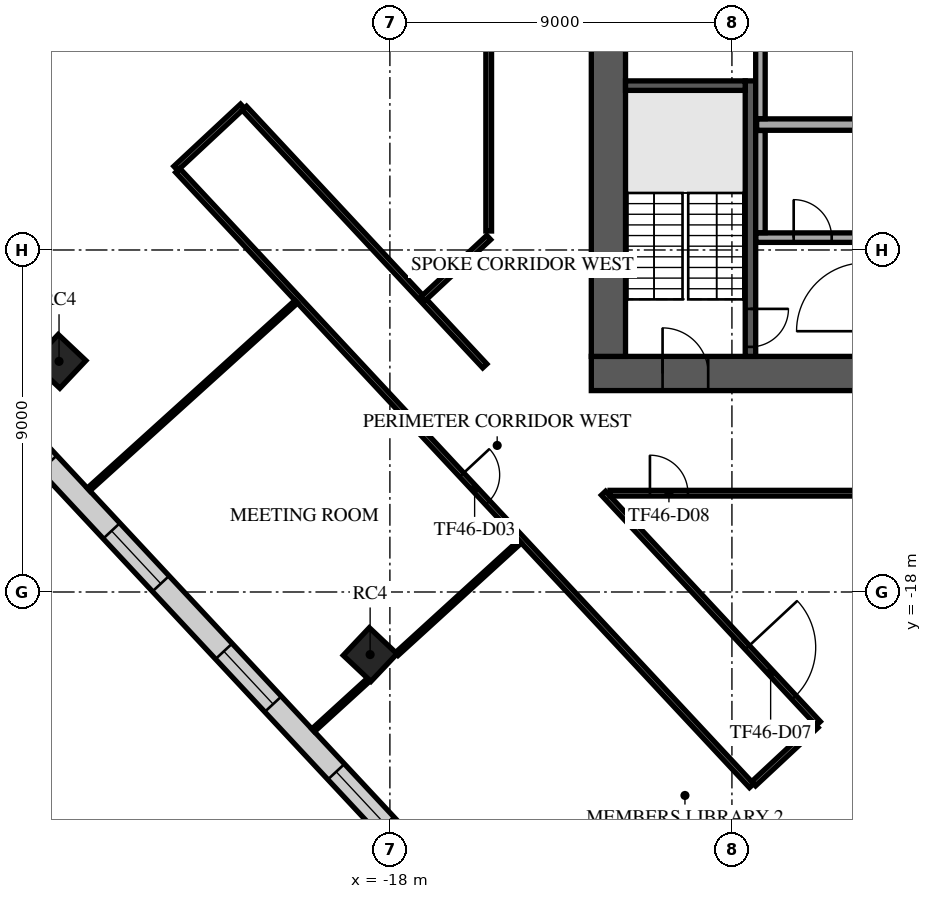
"""IFC4 building model, lengths in metres.
Left out: names, types, materials, properties, quantities, classifications, styles, units other than length and angle.
Written with IfcOpenShell. Run it as: python <this file> out.ifc"""

import sys

from ifc_helpers import new_model, si_unit, direction, frame, frame_2d, origin, origin_2d, place, context, subcontext, project, spatial, rectangle, extrude, element, fill, save


model = new_model("IFC4")
c1 = context("Model", 3, precision=1e-05, world=origin(), true_north=direction((0.0, 1.0)))
c2 = subcontext(c1, "Body", "Model", "MODEL_VIEW")
j1 = project(units=[si_unit("LENGTHUNIT", "METRE"), si_unit("PLANEANGLEUNIT", "RADIAN")], contexts=[c1])
p1 = place(None, origin())
s1 = spatial("IfcSite", under=j1, at=p1, CompositionType="ELEMENT")
p2 = place(p1, origin())
s2 = spatial("IfcBuilding", under=s1, at=p2, CompositionType="ELEMENT")
p3 = place(p2, frame((0.0, 0.0, 197.3)))
s3 = spatial("IfcBuildingStorey", under=s2, at=p3, CompositionType="ELEMENT", Elevation=197.3)
for number, where, z_axis, x_axis in (
    (1, (-26.706, -11.931, 0.0), (0.0, 0.0, 1.0), (0.686, 0.728, 0.0)),
    (2, (-18.52, -19.647, 0.0), (0.0, 0.0, 1.0), (0.686, 0.728, 0.0)),
):
    element("IfcColumn", number, at=place(p3, frame(where, z_axis=z_axis, x_axis=x_axis)), inside=s3, PredefinedType="COLUMN", context=c2, shape_type="SweptSolid", body=[
        extrude(rectangle(XDim=1.0, YDim=1.0, at=origin_2d()), origin(), (0.0, 0.0, 1.0), 4.0),
    ])
p4 = place(p3, frame((-12.7, -12.25, 0.0), z_axis=(0.0, 0.0, 1.0), x_axis=(1.0, 0.0, 0.0)))
e3 = element("IfcWall", 3, at=p4, inside=s3, PredefinedType="SHEAR", context=c2, shape_type="SweptSolid", body=[
    extrude(rectangle(XDim=25.4, YDim=0.9, at=frame_2d((12.7, 0.0))), origin(), (0.0, 0.0, 1.0), 3.62),
])
p5 = place(p4, frame((7.6, 0.0, 0.0)))
e4 = element("IfcOpeningElement", 4, at=p5, cuts=e3, PredefinedType="OPENING", context=c2, shape_type="SweptSolid", body=[
    extrude(rectangle(XDim=2.0, YDim=2.1, at=frame_2d((1.0, 1.05))), frame((0.0, 0.46, 0.0), z_axis=(0.0, -1.0, 0.0), x_axis=(1.0, 0.0, 0.0)), (0.0, 0.0, 1.0), 0.92),
])
p6 = place(p4, frame((17.725, 0.0, 0.0)))
e5 = element("IfcOpeningElement", 5, at=p6, cuts=e3, PredefinedType="OPENING", context=c2, shape_type="SweptSolid", body=[
    extrude(rectangle(XDim=1.2, YDim=2.1, at=frame_2d((0.6, 1.05))), frame((0.0, 0.46, 0.0), z_axis=(0.0, -1.0, 0.0), x_axis=(1.0, 0.0, 0.0)), (0.0, 0.0, 1.0), 0.92),
])
p7 = place(p4, frame((1.875, 0.0, 0.0)))
e6 = element("IfcOpeningElement", 6, at=p7, cuts=e3, PredefinedType="OPENING", context=c2, shape_type="SweptSolid", body=[
    extrude(rectangle(XDim=1.2, YDim=2.1, at=frame_2d((0.6, 1.05))), frame((0.0, 0.46, 0.0), z_axis=(0.0, -1.0, 0.0), x_axis=(1.0, 0.0, 0.0)), (0.0, 0.0, 1.0), 0.92),
])
p8 = place(p4, frame((22.325, 0.0, 0.0)))
e7 = element("IfcOpeningElement", 7, at=p8, cuts=e3, PredefinedType="OPENING", context=c2, shape_type="SweptSolid", body=[
    extrude(rectangle(XDim=1.2, YDim=2.1, at=frame_2d((0.6, 1.05))), frame((0.0, 0.46, 0.0), z_axis=(0.0, -1.0, 0.0), x_axis=(1.0, 0.0, 0.0)), (0.0, 0.0, 1.0), 0.92),
])
p9 = place(p3, frame((-12.25, -11.8, 0.0), z_axis=(0.0, 0.0, 1.0), x_axis=(0.0, 1.0, 0.0)))
e8 = element("IfcWall", 8, at=p9, inside=s3, PredefinedType="SHEAR", context=c2, shape_type="SweptSolid", body=[
    extrude(rectangle(XDim=23.6, YDim=0.9, at=frame_2d((11.8, 0.0))), origin(), (0.0, 0.0, 1.0), 3.62),
])
p10 = place(p9, frame((10.6, 0.0, 0.0)))
e9 = element("IfcOpeningElement", 9, at=p10, cuts=e8, PredefinedType="OPENING", context=c2, shape_type="SweptSolid", body=[
    extrude(rectangle(XDim=2.4, YDim=2.4, at=frame_2d((1.2, 1.2))), frame((0.0, 0.46, 0.0), z_axis=(0.0, -1.0, 0.0), x_axis=(1.0, 0.0, 0.0)), (0.0, 0.0, 1.0), 0.92),
])
p11 = place(p3, frame((-8.512, -4.55, 0.0), z_axis=(0.0, 0.0, 1.0), x_axis=(0.0, -1.0, 0.0)))
e10 = element("IfcWall", 10, at=p11, inside=s3, PredefinedType="SOLIDWALL", context=c2, shape_type="SweptSolid", body=[
    extrude(rectangle(XDim=7.25, YDim=0.275, at=frame_2d((3.625, 0.0))), origin(), (0.0, 0.0, 1.0), 3.62),
])
p12 = place(p11, frame((6.0, 0.0, 0.0)))
e11 = element("IfcOpeningElement", 11, at=p12, cuts=e10, PredefinedType="OPENING", context=c2, shape_type="SweptSolid", body=[
    extrude(rectangle(XDim=1.0, YDim=2.1, at=frame_2d((0.5, 1.05))), frame((0.0, 0.147, 0.0), z_axis=(0.0, -1.0, 0.0), x_axis=(1.0, 0.0, 0.0)), (0.0, 0.0, 1.0), 0.295),
])
p13 = place(p3, frame((-8.65, -4.675, 0.0), z_axis=(0.0, 0.0, 1.0), x_axis=(-1.0, 0.0, 0.0)))
e12 = element("IfcWall", 12, at=p13, inside=s3, PredefinedType="SOLIDWALL", context=c2, shape_type="SweptSolid", body=[
    extrude(rectangle(XDim=3.15, YDim=0.25, at=frame_2d((1.575, 0.0))), origin(), (0.0, 0.0, 1.0), 3.62),
])
p14 = place(p3, frame((-8.37, -8.675, 0.0), z_axis=(0.0, 0.0, 1.0), x_axis=(1.0, 0.0, 0.0)))
e13 = element("IfcWall", 13, at=p14, inside=s3, PredefinedType="PARTITIONING", context=c2, shape_type="SweptSolid", body=[
    extrude(rectangle(XDim=5.49, YDim=0.25, at=frame_2d((2.745, 0.0))), origin(), (0.0, 0.0, 1.0), 3.62),
])
p15 = place(p14, frame((0.995, 0.0, 0.0)))
e14 = element("IfcOpeningElement", 14, at=p15, cuts=e13, PredefinedType="OPENING", context=c2, shape_type="SweptSolid", body=[
    extrude(rectangle(XDim=1.0, YDim=2.1, at=frame_2d((0.5, 1.05))), frame((0.0, 0.135, 0.0), z_axis=(0.0, -1.0, 0.0), x_axis=(1.0, 0.0, 0.0)), (0.0, 0.0, 1.0), 0.27),
])
p16 = place(p14, frame((3.745, 0.0, 0.0)))
e15 = element("IfcOpeningElement", 15, at=p16, cuts=e13, PredefinedType="OPENING", context=c2, shape_type="SweptSolid", body=[
    extrude(rectangle(XDim=1.0, YDim=2.1, at=frame_2d((0.5, 1.05))), frame((0.0, 0.135, 0.0), z_axis=(0.0, -1.0, 0.0), x_axis=(1.0, 0.0, 0.0)), (0.0, 0.0, 1.0), 0.27),
])
p17 = place(p3, frame((-8.25, -8.545, 0.0), z_axis=(0.0, 0.0, 1.0), x_axis=(0.0, 1.0, 0.0)))
e16 = element("IfcWall", 16, at=p17, inside=s3, PredefinedType="PARTITIONING", context=c2, shape_type="SweptSolid", body=[
    extrude(rectangle(XDim=2.69, YDim=0.25, at=frame_2d((1.345, 0.0))), origin(), (0.0, 0.0, 1.0), 3.62),
])
p18 = place(p3, frame((-8.35, -5.7, 0.0), z_axis=(0.0, 0.0, 1.0), x_axis=(1.0, 0.0, 0.0)))
e17 = element("IfcWall", 17, at=p18, inside=s3, PredefinedType="PARTITIONING", context=c2, shape_type="SweptSolid", body=[
    extrude(rectangle(XDim=5.47, YDim=0.3, at=frame_2d((2.735, 0.0))), origin(), (0.0, 0.0, 1.0), 3.62),
])
p19 = place(p3, frame((-8.25, -5.545, 0.0), z_axis=(0.0, 0.0, 1.0), x_axis=(0.0, 1.0, 0.0)))
e18 = element("IfcWall", 18, at=p19, inside=s3, PredefinedType="PARTITIONING", context=c2, shape_type="SweptSolid", body=[
    extrude(rectangle(XDim=2.69, YDim=0.25, at=frame_2d((1.345, 0.0))), origin(), (0.0, 0.0, 1.0), 3.62),
])
p20 = place(p3, frame((-35.02, -5.994, 0.0), z_axis=(0.0, 0.0, 1.0), x_axis=(0.682002361324, -0.731349970362, 0.0)))
e19 = element("IfcWall", 19, at=p20, inside=s3, PredefinedType="STANDARD", context=c2, shape_type="SweptSolid", body=[
    extrude(rectangle(XDim=39.0, YDim=0.6, at=frame_2d((19.5, 0.0))), origin(), (0.0, 0.0, 1.0), 3.62),
])
p21 = place(p20, frame((1.217, 0.0, 0.9)))
e20 = element("IfcOpeningElement", 20, at=p21, cuts=e19, PredefinedType="OPENING", context=c2, shape_type="SweptSolid", body=[
    extrude(rectangle(XDim=1.9, YDim=2.1, at=frame_2d((0.95, 1.05))), frame((0.0, 0.31, 0.0), z_axis=(0.0, -1.0, 0.0), x_axis=(1.0, 0.0, 0.0)), (0.0, 0.0, 1.0), 0.62),
])
p22 = place(p20, frame((5.55, 0.0, 0.9)))
e21 = element("IfcOpeningElement", 21, at=p22, cuts=e19, PredefinedType="OPENING", context=c2, shape_type="SweptSolid", body=[
    extrude(rectangle(XDim=1.9, YDim=2.1, at=frame_2d((0.95, 1.05))), frame((0.0, 0.31, 0.0), z_axis=(0.0, -1.0, 0.0), x_axis=(1.0, 0.0, 0.0)), (0.0, 0.0, 1.0), 0.62),
])
p23 = place(p20, frame((9.883, 0.0, 0.9)))
e22 = element("IfcOpeningElement", 22, at=p23, cuts=e19, PredefinedType="OPENING", context=c2, shape_type="SweptSolid", body=[
    extrude(rectangle(XDim=1.9, YDim=2.1, at=frame_2d((0.95, 1.05))), frame((0.0, 0.31, 0.0), z_axis=(0.0, -1.0, 0.0), x_axis=(1.0, 0.0, 0.0)), (0.0, 0.0, 1.0), 0.62),
])
p24 = place(p20, frame((14.217, 0.0, 0.9)))
e23 = element("IfcOpeningElement", 23, at=p24, cuts=e19, PredefinedType="OPENING", context=c2, shape_type="SweptSolid", body=[
    extrude(rectangle(XDim=1.9, YDim=2.1, at=frame_2d((0.95, 1.05))), frame((0.0, 0.31, 0.0), z_axis=(0.0, -1.0, 0.0), x_axis=(1.0, 0.0, 0.0)), (0.0, 0.0, 1.0), 0.62),
])
p25 = place(p20, frame((18.55, 0.0, 0.9)))
e24 = element("IfcOpeningElement", 24, at=p25, cuts=e19, PredefinedType="OPENING", context=c2, shape_type="SweptSolid", body=[
    extrude(rectangle(XDim=1.9, YDim=2.1, at=frame_2d((0.95, 1.05))), frame((0.0, 0.31, 0.0), z_axis=(0.0, -1.0, 0.0), x_axis=(1.0, 0.0, 0.0)), (0.0, 0.0, 1.0), 0.62),
])
p26 = place(p20, frame((22.883, 0.0, 0.9)))
e25 = element("IfcOpeningElement", 25, at=p26, cuts=e19, PredefinedType="OPENING", context=c2, shape_type="SweptSolid", body=[
    extrude(rectangle(XDim=1.9, YDim=2.1, at=frame_2d((0.95, 1.05))), frame((0.0, 0.31, 0.0), z_axis=(0.0, -1.0, 0.0), x_axis=(1.0, 0.0, 0.0)), (0.0, 0.0, 1.0), 0.62),
])
p27 = place(p20, frame((27.217, 0.0, 0.9)))
e26 = element("IfcOpeningElement", 26, at=p27, cuts=e19, PredefinedType="OPENING", context=c2, shape_type="SweptSolid", body=[
    extrude(rectangle(XDim=1.9, YDim=2.1, at=frame_2d((0.95, 1.05))), frame((0.0, 0.31, 0.0), z_axis=(0.0, -1.0, 0.0), x_axis=(1.0, 0.0, 0.0)), (0.0, 0.0, 1.0), 0.62),
])
p28 = place(p20, frame((31.55, 0.0, 0.9)))
e27 = element("IfcOpeningElement", 27, at=p28, cuts=e19, PredefinedType="OPENING", context=c2, shape_type="SweptSolid", body=[
    extrude(rectangle(XDim=1.9, YDim=2.1, at=frame_2d((0.95, 1.05))), frame((0.0, 0.31, 0.0), z_axis=(0.0, -1.0, 0.0), x_axis=(1.0, 0.0, 0.0)), (0.0, 0.0, 1.0), 0.62),
])
p29 = place(p20, frame((35.883, 0.0, 0.9)))
e28 = element("IfcOpeningElement", 28, at=p29, cuts=e19, PredefinedType="OPENING", context=c2, shape_type="SweptSolid", body=[
    extrude(rectangle(XDim=1.9, YDim=2.1, at=frame_2d((0.95, 1.05))), frame((0.0, 0.31, 0.0), z_axis=(0.0, -1.0, 0.0), x_axis=(1.0, 0.0, 0.0)), (0.0, 0.0, 1.0), 0.62),
])
p30 = place(p3, frame((-23.633, -6.852, 0.0), z_axis=(0.0, 0.0, 1.0), x_axis=(0.731295398421, 0.682060877231, 0.0)))
e29 = element("IfcWall", 29, at=p30, inside=s3, PredefinedType="PARTITIONING", context=c2, shape_type="SweptSolid", body=[
    extrude(rectangle(XDim=2.4, YDim=0.15, at=frame_2d((1.2, 0.0))), origin(), (0.0, 0.0, 1.0), 3.62),
])
p31 = place(p3, frame((-23.582, -6.907, 0.0), z_axis=(0.0, 0.0, 1.0), x_axis=(0.68201130552, -0.73134162957, 0.0)))
e30 = element("IfcWall", 30, at=p31, inside=s3, PredefinedType="PARTITIONING", context=c2, shape_type="SweptSolid", body=[
    extrude(rectangle(XDim=22.137, YDim=0.15, at=frame_2d((11.069, 0.0))), origin(), (0.0, 0.0, 1.0), 3.17),
])
p32 = place(p31, frame((10.953, 0.0, 0.0)))
e31 = element("IfcOpeningElement", 31, at=p32, cuts=e30, PredefinedType="OPENING", context=c2, shape_type="SweptSolid", body=[
    extrude(rectangle(XDim=1.0, YDim=2.1, at=frame_2d((0.5, 1.05))), frame((0.0, 0.085, 0.0), z_axis=(0.0, -1.0, 0.0), x_axis=(1.0, 0.0, 0.0)), (0.0, 0.0, 1.0), 0.17),
])
p33 = place(p3, frame((-21.827, -5.27, 0.0), z_axis=(0.0, 0.0, 1.0), x_axis=(0.682018934887, -0.731334514744, 0.0)))
e32 = element("IfcWall", 32, at=p33, inside=s3, PredefinedType="PARTITIONING", context=c2, shape_type="SweptSolid", body=[
    extrude(rectangle(XDim=9.272, YDim=0.15, at=frame_2d((4.636, 0.0))), origin(), (0.0, 0.0, 1.0), 3.17),
])
p34 = place(p3, frame((-17.14, -10.295, 0.0), z_axis=(0.0, 0.0, 1.0), x_axis=(0.731509059071, 0.681831721539, 0.0)))
e33 = element("IfcWall", 33, at=p34, inside=s3, PredefinedType="PARTITIONING", context=c2, shape_type="SweptSolid", body=[
    extrude(rectangle(XDim=2.379, YDim=0.15, at=frame_2d((1.189, 0.0))), origin(), (0.0, 0.0, 1.0), 3.62),
])
p35 = place(p3, frame((-15.4, -8.5, 0.0), z_axis=(0.0, 0.0, 1.0), x_axis=(0.0, 1.0, 0.0)))
e34 = element("IfcWall", 34, at=p35, inside=s3, PredefinedType="PARTITIONING", context=c2, shape_type="SweptSolid", body=[
    extrude(rectangle(XDim=16.948, YDim=0.15, at=frame_2d((8.474, 0.0))), origin(), (0.0, 0.0, 1.0), 3.17),
])
p36 = place(p35, frame((14.551, 0.0, 0.0)))
e35 = element("IfcOpeningElement", 35, at=p36, cuts=e34, PredefinedType="OPENING", context=c2, shape_type="SweptSolid", body=[
    extrude(rectangle(XDim=1.0, YDim=2.1, at=frame_2d((0.5, 1.05))), frame((0.0, 0.085, 0.0), z_axis=(0.0, -1.0, 0.0), x_axis=(1.0, 0.0, 0.0)), (0.0, 0.0, 1.0), 0.17),
])
p37 = place(p3, frame((-12.38, -15.4, 0.0), z_axis=(0.0, 0.0, 1.0), x_axis=(0.681925559665, -0.731421582314, 0.0)))
e36 = element("IfcWall", 36, at=p37, inside=s3, PredefinedType="PARTITIONING", context=c2, shape_type="SweptSolid", body=[
    extrude(rectangle(XDim=8.287, YDim=0.15, at=frame_2d((4.143, 0.0))), origin(), (0.0, 0.0, 1.0), 3.17),
])
p38 = place(p37, frame((5.55, 0.0, 0.0)))
e37 = element("IfcOpeningElement", 37, at=p38, cuts=e36, PredefinedType="OPENING", context=c2, shape_type="SweptSolid", body=[
    extrude(rectangle(XDim=1.8, YDim=2.1, at=frame_2d((0.9, 1.05))), frame((0.0, 0.085, 0.0), z_axis=(0.0, -1.0, 0.0), x_axis=(1.0, 0.0, 0.0)), (0.0, 0.0, 1.0), 0.17),
])
p39 = place(p3, frame((-12.208, -15.4, 0.0), z_axis=(0.0, 0.0, 1.0), x_axis=(1.0, 0.0, 0.0)))
e38 = element("IfcWall", 38, at=p39, inside=s3, PredefinedType="PARTITIONING", context=c2, shape_type="SweptSolid", body=[
    extrude(rectangle(XDim=20.336, YDim=0.15, at=frame_2d((10.168, 0.0))), origin(), (0.0, 0.0, 1.0), 3.17),
])
p40 = place(p39, frame((1.05, 0.0, 0.0)))
e39 = element("IfcOpeningElement", 39, at=p40, cuts=e38, PredefinedType="OPENING", context=c2, shape_type="SweptSolid", body=[
    extrude(rectangle(XDim=1.0, YDim=2.1, at=frame_2d((0.5, 1.05))), frame((0.0, 0.085, 0.0), z_axis=(0.0, -1.0, 0.0), x_axis=(1.0, 0.0, 0.0)), (0.0, 0.0, 1.0), 0.17),
])
p41 = place(p39, frame((15.818, 0.0, 0.0)))
e40 = element("IfcOpeningElement", 40, at=p41, cuts=e38, PredefinedType="OPENING", context=c2, shape_type="SweptSolid", body=[
    extrude(rectangle(XDim=1.0, YDim=2.1, at=frame_2d((0.5, 1.05))), frame((0.0, 0.085, 0.0), z_axis=(0.0, -1.0, 0.0), x_axis=(1.0, 0.0, 0.0)), (0.0, 0.0, 1.0), 0.17),
])
p42 = place(p3, frame((-8.429, -23.046, 0.0), z_axis=(0.0, 0.0, 1.0), x_axis=(0.731473834751, 0.681869510299, 0.0)))
e41 = element("IfcWall", 41, at=p42, inside=s3, PredefinedType="PARTITIONING", context=c2, shape_type="SweptSolid", body=[
    extrude(rectangle(XDim=2.249, YDim=0.15, at=frame_2d((1.125, 0.0))), origin(), (0.0, 0.0, 1.0), 3.62),
])
p43 = place(p3, frame((-25.927, -15.302, 0.0), z_axis=(0.0, 0.0, 1.0), x_axis=(0.741648836196, 0.670788344986, 0.0)))
e42 = element("IfcWall", 42, at=p43, inside=s3, PredefinedType="PARTITIONING", context=c2, shape_type="SweptSolid", body=[
    extrude(rectangle(XDim=7.366, YDim=0.1, at=frame_2d((3.683, 0.0))), origin(), (0.0, 0.0, 1.0), 2.97),
])
p44 = place(p3, frame((-20.018, -21.638, 0.0), z_axis=(0.0, 0.0, 1.0), x_axis=(0.738813357268, 0.673910100178, 0.0)))
e43 = element("IfcWall", 43, at=p44, inside=s3, PredefinedType="PARTITIONING", context=c2, shape_type="SweptSolid", body=[
    extrude(rectangle(XDim=1.982, YDim=0.1, at=frame_2d((0.991, 0.0))), origin(), (0.0, 0.0, 1.0), 3.62),
])
p45 = place(p3, frame((-17.819, -19.632, 0.0), z_axis=(0.0, 0.0, 1.0), x_axis=(0.738796153114, 0.673928960755, 0.0)))
e44 = element("IfcWall", 44, at=p45, inside=s3, PredefinedType="PARTITIONING", context=c2, shape_type="SweptSolid", body=[
    extrude(rectangle(XDim=4.388, YDim=0.1, at=frame_2d((2.194, 0.0))), origin(), (0.0, 0.0, 1.0), 3.05),
])
p46 = place(p7, origin())
e45 = element("IfcDoor", 45, at=p46, inside=s3, OperationType="SINGLE_SWING_LEFT", PredefinedType="DOOR", context=c2, shape_type="SweptSolid", body=[
    extrude(rectangle(XDim=1.2, YDim=2.1, at=frame_2d((0.6, 1.05))), frame((0.0, 0.025, 0.0), z_axis=(0.0, -1.0, 0.0), x_axis=(1.0, 0.0, 0.0)), (0.0, 0.0, 1.0), 0.05),
])
fill(e6, e45)
p47 = place(p12, origin())
e46 = element("IfcDoor", 46, at=p47, inside=s3, OperationType="SINGLE_SWING_LEFT", PredefinedType="DOOR", context=c2, shape_type="SweptSolid", body=[
    extrude(rectangle(XDim=1.0, YDim=2.1, at=frame_2d((0.5, 1.05))), frame((0.0, 0.025, 0.0), z_axis=(0.0, -1.0, 0.0), x_axis=(1.0, 0.0, 0.0)), (0.0, 0.0, 1.0), 0.05),
])
fill(e11, e46)
p48 = place(p15, origin())
e47 = element("IfcDoor", 47, at=p48, inside=s3, OperationType="SINGLE_SWING_LEFT", PredefinedType="DOOR", context=c2, shape_type="SweptSolid", body=[
    extrude(rectangle(XDim=1.0, YDim=2.1, at=frame_2d((0.5, 1.05))), frame((0.0, 0.025, 0.0), z_axis=(0.0, -1.0, 0.0), x_axis=(1.0, 0.0, 0.0)), (0.0, 0.0, 1.0), 0.05),
])
fill(e14, e47)
p49 = place(p24, origin())
e48 = element("IfcWindow", 48, at=p49, inside=s3, PartitioningType="SINGLE_PANEL", PredefinedType="WINDOW", context=c2, shape_type="SweptSolid", body=[
    extrude(rectangle(XDim=1.9, YDim=2.1, at=frame_2d((0.95, 1.05))), frame((0.0, 0.03, 0.0), z_axis=(0.0, -1.0, 0.0), x_axis=(1.0, 0.0, 0.0)), (0.0, 0.0, 1.0), 0.06),
])
fill(e23, e48)
p50 = place(p25, origin())
e49 = element("IfcWindow", 49, at=p50, inside=s3, PartitioningType="SINGLE_PANEL", PredefinedType="WINDOW", context=c2, shape_type="SweptSolid", body=[
    extrude(rectangle(XDim=1.9, YDim=2.1, at=frame_2d((0.95, 1.05))), frame((0.0, 0.03, 0.0), z_axis=(0.0, -1.0, 0.0), x_axis=(1.0, 0.0, 0.0)), (0.0, 0.0, 1.0), 0.06),
])
fill(e24, e49)
p51 = place(p26, origin())
e50 = element("IfcWindow", 50, at=p51, inside=s3, PartitioningType="SINGLE_PANEL", PredefinedType="WINDOW", context=c2, shape_type="SweptSolid", body=[
    extrude(rectangle(XDim=1.9, YDim=2.1, at=frame_2d((0.95, 1.05))), frame((0.0, 0.03, 0.0), z_axis=(0.0, -1.0, 0.0), x_axis=(1.0, 0.0, 0.0)), (0.0, 0.0, 1.0), 0.06),
])
fill(e25, e50)
p52 = place(p32, frame((1.0, 0.0, 0.0), z_axis=(0.0, 0.0, 1.0), x_axis=(-1.0, 0.0, 0.0)))
e51 = element("IfcDoor", 51, at=p52, inside=s3, OperationType="SINGLE_SWING_RIGHT", PredefinedType="DOOR", context=c2, shape_type="SweptSolid", body=[
    extrude(rectangle(XDim=1.0, YDim=2.1, at=frame_2d((0.5, 1.05))), frame((0.0, 0.025, 0.0), z_axis=(0.0, -1.0, 0.0), x_axis=(1.0, 0.0, 0.0)), (0.0, 0.0, 1.0), 0.05),
])
fill(e31, e51)
p53 = place(p38, origin())
e52 = element("IfcDoor", 52, at=p53, inside=s3, OperationType="DOUBLE_DOOR_SINGLE_SWING", PredefinedType="DOOR", context=c2, shape_type="SweptSolid", body=[
    extrude(rectangle(XDim=1.8, YDim=2.1, at=frame_2d((0.9, 1.05))), frame((0.0, 0.025, 0.0), z_axis=(0.0, -1.0, 0.0), x_axis=(1.0, 0.0, 0.0)), (0.0, 0.0, 1.0), 0.05),
])
fill(e37, e52)
p54 = place(p40, frame((1.0, 0.0, 0.0), z_axis=(0.0, 0.0, 1.0), x_axis=(-1.0, 0.0, 0.0)))
e53 = element("IfcDoor", 53, at=p54, inside=s3, OperationType="SINGLE_SWING_RIGHT", PredefinedType="DOOR", context=c2, shape_type="SweptSolid", body=[
    extrude(rectangle(XDim=1.0, YDim=2.1, at=frame_2d((0.5, 1.05))), frame((0.0, 0.025, 0.0), z_axis=(0.0, -1.0, 0.0), x_axis=(1.0, 0.0, 0.0)), (0.0, 0.0, 1.0), 0.05),
])
fill(e39, e53)
save(model, sys.argv[1])
